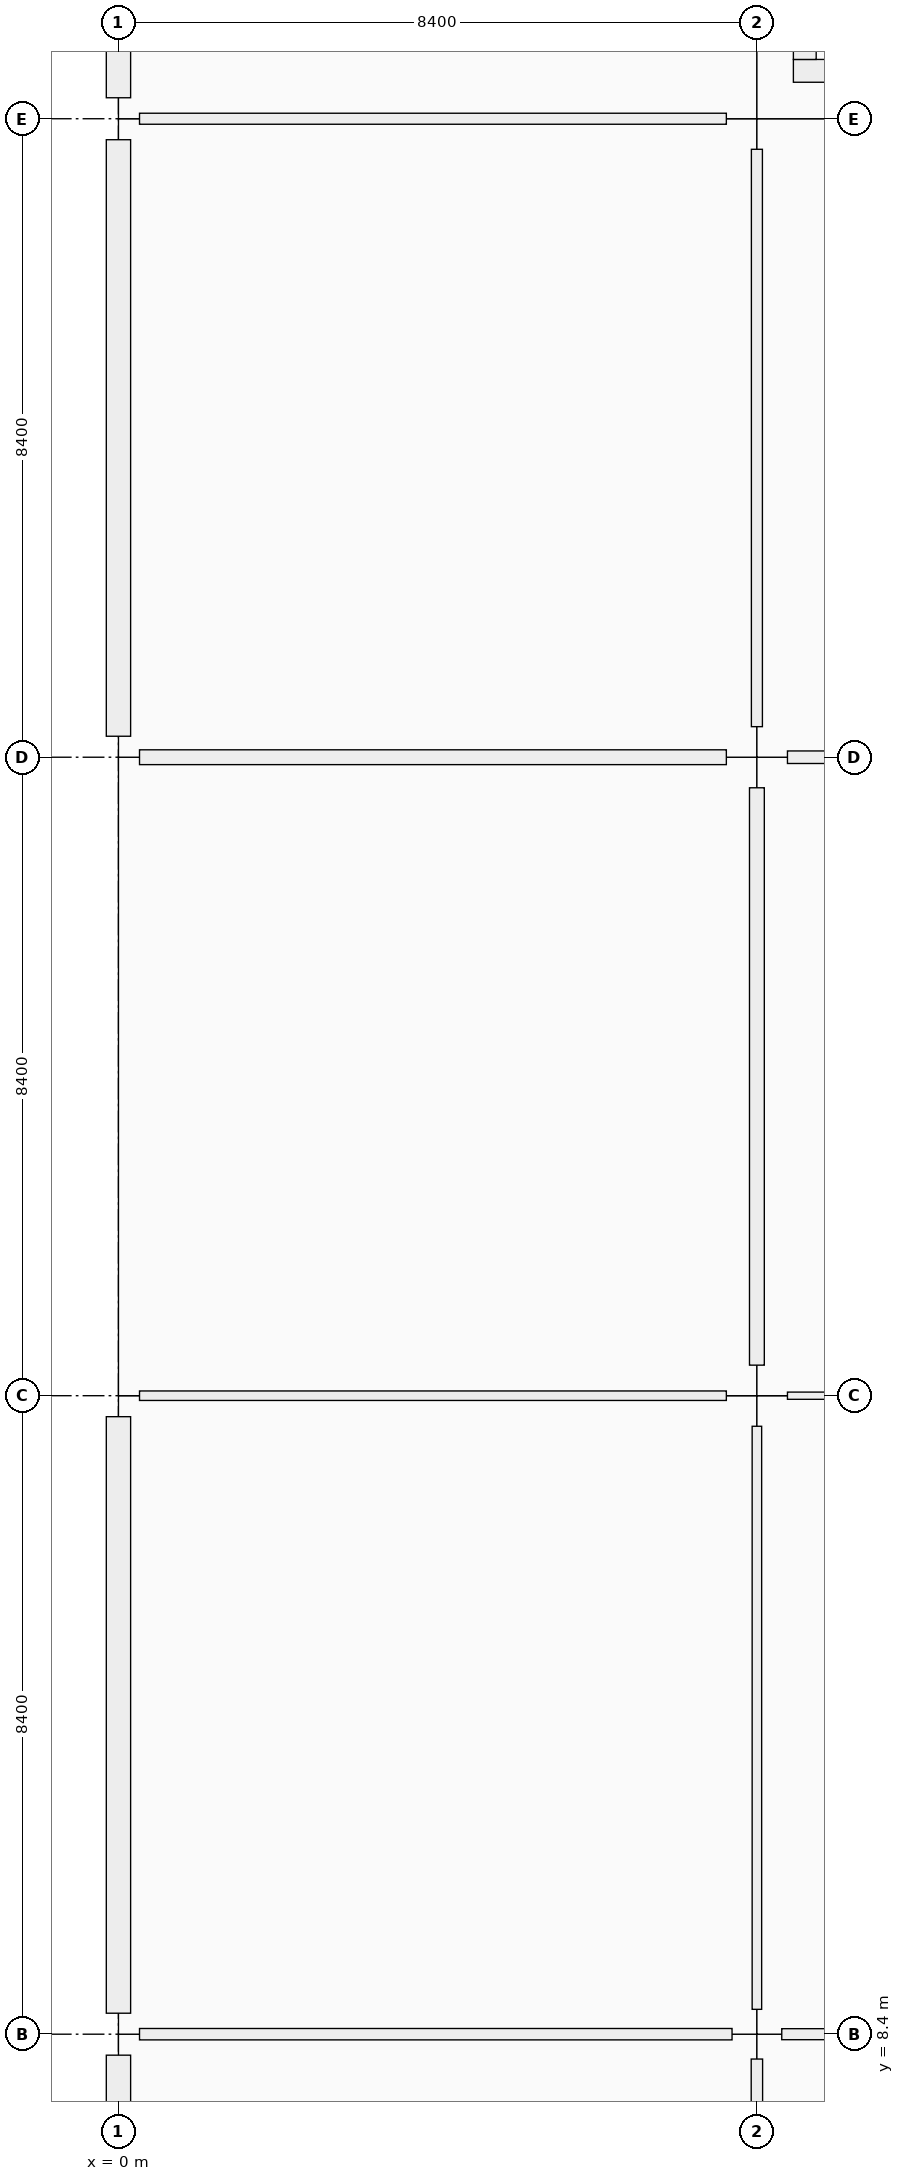
"""IFC4 building model, lengths in metres.
Left out: names, types, materials, properties, quantities, classifications, styles, units other than length and angle.
Written with IfcOpenShell. Run it as: python <this file> out.ifc"""

import sys

from ifc_helpers import new_model, si_unit, direction, frame, frame_2d, origin, origin_2d, place, context, subcontext, project, spatial, rectangle, extrude, element, fill, save


model = new_model("IFC4")
c1 = context("Model", 3, precision=1e-05, world=origin(), true_north=direction((0.0, 1.0)))
c2 = subcontext(c1, "Body", "Model", "MODEL_VIEW")
j1 = project(units=[si_unit("LENGTHUNIT", "METRE"), si_unit("PLANEANGLEUNIT", "RADIAN")], contexts=[c1])
p1 = place(None, origin())
s1 = spatial("IfcSite", under=j1, at=p1, CompositionType="ELEMENT")
p2 = place(p1, origin())
s2 = spatial("IfcBuilding", under=s1, at=p2, CompositionType="ELEMENT")
p3 = place(p2, frame((0.0, 0.0, 5.76)))
s3 = spatial("IfcBuildingStorey", under=s2, at=p3, CompositionType="ELEMENT", Elevation=5.76)
for number, where, z_axis, x_axis in (
    (1, (0.0, 8.4, 0.0), (0.0, 0.0, 1.0), (1.0, 0.0, 0.0)),
    (2, (0.0, 16.8, 0.0), (0.0, 0.0, 1.0), (1.0, 0.0, 0.0)),
    (3, (0.0, 25.2, 0.0), (0.0, 0.0, 1.0), (1.0, 0.0, 0.0)),
    (4, (0.0, 33.6, 0.0), (0.0, 0.0, 1.0), (1.0, 0.0, 0.0)),
):
    element("IfcColumn", number, at=place(p3, frame(where, z_axis=z_axis, x_axis=x_axis)), inside=s3, PredefinedType="COLUMN", context=c2, shape_type="SweptSolid", body=[
        extrude(rectangle(XDim=0.55, YDim=0.55, at=origin_2d()), origin(), (0.0, 0.0, 1.0), 4.2),
    ])
p4 = place(p3, frame((8.4, 8.4, 0.0), z_axis=(0.0, 0.0, 1.0), x_axis=(1.0, 0.0, 0.0)))
e5 = element("IfcColumn", 5, at=p4, inside=s3, PredefinedType="COLUMN", context=c2, shape_type="SweptSolid", body=[
    extrude(rectangle(XDim=0.65, YDim=0.65, at=origin_2d()), origin(), (0.0, 0.0, 1.0), 4.5),
])
for number, where, z_axis, x_axis in (
    (6, (8.4, 16.8, 0.0), (0.0, 0.0, 1.0), (1.0, 0.0, 0.0)),
    (7, (8.4, 25.2, 0.0), (0.0, 0.0, 1.0), (1.0, 0.0, 0.0)),
    (8, (8.4, 33.6, 0.0), (0.0, 0.0, 1.0), (1.0, 0.0, 0.0)),
):
    element("IfcColumn", number, at=place(p3, frame(where, z_axis=z_axis, x_axis=x_axis)), inside=s3, PredefinedType="COLUMN", context=c2, shape_type="SweptSolid", body=[
        extrude(rectangle(XDim=0.8, YDim=0.8, at=origin_2d()), origin(), (0.0, 0.0, 1.0), 4.5),
    ])
p5 = place(p3, frame((0.0, 0.276, 0.0), z_axis=(0.0, 0.0, 1.0), x_axis=(0.0, 1.0, 0.0)))
e9 = element("IfcWall", 9, at=p5, inside=s3, PredefinedType="SOLIDWALL", context=c2, shape_type="SweptSolid", body=[
    extrude(rectangle(XDim=7.848, YDim=0.32, at=frame_2d((3.924, 0.0))), origin(), (0.0, 0.0, 1.0), 3.4),
])
p6 = place(p5, frame((2.524, 0.0, 0.9)))
e10 = element("IfcOpeningElement", 10, at=p6, cuts=e9, PredefinedType="OPENING", context=c2, shape_type="SweptSolid", body=[
    extrude(rectangle(XDim=2.8, YDim=1.75, at=frame_2d((1.4, 0.875))), frame((0.0, 0.16, 0.0), z_axis=(0.0, -1.0, 0.0), x_axis=(1.0, 0.0, 0.0)), (0.0, 0.0, 1.0), 0.32),
])
p7 = place(p3, frame((0.0, 8.676, 0.0), z_axis=(0.0, 0.0, 1.0), x_axis=(0.0, 1.0, 0.0)))
e11 = element("IfcWall", 11, at=p7, inside=s3, PredefinedType="SOLIDWALL", context=c2, shape_type="SweptSolid", body=[
    extrude(rectangle(XDim=7.848, YDim=0.32, at=frame_2d((3.924, 0.0))), origin(), (0.0, 0.0, 1.0), 3.4),
])
p8 = place(p7, frame((2.974, 0.0, 0.9)))
e12 = element("IfcOpeningElement", 12, at=p8, cuts=e11, PredefinedType="OPENING", context=c2, shape_type="SweptSolid", body=[
    extrude(rectangle(XDim=1.9, YDim=1.75, at=frame_2d((0.95, 0.875))), frame((0.0, 0.16, 0.0), z_axis=(0.0, -1.0, 0.0), x_axis=(1.0, 0.0, 0.0)), (0.0, 0.0, 1.0), 0.32),
])
p9 = place(p3, frame((0.0, 25.476, 0.0), z_axis=(0.0, 0.0, 1.0), x_axis=(0.0, 1.0, 0.0)))
e13 = element("IfcWall", 13, at=p9, inside=s3, PredefinedType="SOLIDWALL", context=c2, shape_type="SweptSolid", body=[
    extrude(rectangle(XDim=7.848, YDim=0.32, at=frame_2d((3.924, 0.0))), origin(), (0.0, 0.0, 1.0), 3.4),
])
p10 = place(p9, frame((3.224, 0.0, 0.9)))
e14 = element("IfcOpeningElement", 14, at=p10, cuts=e13, PredefinedType="OPENING", context=c2, shape_type="SweptSolid", body=[
    extrude(rectangle(XDim=1.4, YDim=1.75, at=frame_2d((0.7, 0.875))), frame((0.0, 0.16, 0.0), z_axis=(0.0, -1.0, 0.0), x_axis=(1.0, 0.0, 0.0)), (0.0, 0.0, 1.0), 0.32),
])
p11 = place(p3, frame((0.0, 33.876, 0.0), z_axis=(0.0, 0.0, 1.0), x_axis=(0.0, 1.0, 0.0)))
e15 = element("IfcWall", 15, at=p11, inside=s3, PredefinedType="SOLIDWALL", context=c2, shape_type="SweptSolid", body=[
    extrude(rectangle(XDim=7.848, YDim=0.32, at=frame_2d((3.924, 0.0))), origin(), (0.0, 0.0, 1.0), 3.4),
])
p12 = place(p11, frame((2.324, 0.0, 0.9)))
e16 = element("IfcOpeningElement", 16, at=p12, cuts=e15, PredefinedType="OPENING", context=c2, shape_type="SweptSolid", body=[
    extrude(rectangle(XDim=3.2, YDim=1.75, at=frame_2d((1.6, 0.875))), frame((0.0, 0.16, 0.0), z_axis=(0.0, -1.0, 0.0), x_axis=(1.0, 0.0, 0.0)), (0.0, 0.0, 1.0), 0.32),
])
p13 = place(p3, frame((16.32, 34.23, 0.0), z_axis=(0.0, 0.0, 1.0), x_axis=(-1.0, 0.0, 0.0)))
e17 = element("IfcWall", 17, at=p13, inside=s3, PredefinedType="SHEAR", context=c2, shape_type="SweptSolid", body=[
    extrude(rectangle(XDim=7.44, YDim=0.3, at=frame_2d((3.72, 0.0))), origin(), (0.0, 0.0, 1.0), 4.5),
])
p14 = place(p13, frame((1.28, 0.0, 0.0)))
e18 = element("IfcOpeningElement", 18, at=p14, cuts=e17, PredefinedType="OPENING", context=c2, shape_type="SweptSolid", body=[
    extrude(rectangle(XDim=1.5, YDim=2.15, at=frame_2d((0.75, 1.075))), frame((0.0, 0.15, 0.0), z_axis=(0.0, -1.0, 0.0), x_axis=(1.0, 0.0, 0.0)), (0.0, 0.0, 1.0), 0.3),
])
p15 = place(p3, frame((9.03, 34.38, 0.0), z_axis=(0.0, 0.0, 1.0), x_axis=(0.0, 1.0, 0.0)))
e19 = element("IfcWall", 19, at=p15, inside=s3, PredefinedType="SHEAR", context=c2, shape_type="SweptSolid", body=[
    extrude(rectangle(XDim=6.84, YDim=0.3, at=frame_2d((3.42, 0.0))), origin(), (0.0, 0.0, 1.0), 4.5),
])
p16 = place(p3, frame((0.277, 8.4, 0.0), z_axis=(0.0, 0.0, 1.0), x_axis=(1.0, 0.0, 0.0)))
e20 = element("IfcWall", 20, at=p16, inside=s3, PredefinedType="MOVABLE", context=c2, shape_type="SweptSolid", body=[
    extrude(rectangle(XDim=7.796, YDim=0.15, at=frame_2d((3.898, 0.0))), origin(), (0.0, 0.0, 1.0), 2.4),
])
p17 = place(p16, frame((3.358, 0.0, 0.0)))
e21 = element("IfcOpeningElement", 21, at=p17, cuts=e20, PredefinedType="OPENING", context=c2, shape_type="SweptSolid", body=[
    extrude(rectangle(XDim=1.08, YDim=2.22, at=frame_2d((0.54, 1.11))), frame((0.0, 0.075, 0.0), z_axis=(0.0, -1.0, 0.0), x_axis=(1.0, 0.0, 0.0)), (0.0, 0.0, 1.0), 0.15),
])
p18 = place(p3, frame((0.277, 16.8, 0.0), z_axis=(0.0, 0.0, 1.0), x_axis=(1.0, 0.0, 0.0)))
e22 = element("IfcWall", 22, at=p18, inside=s3, PredefinedType="PARTITIONING", context=c2, shape_type="SweptSolid", body=[
    extrude(rectangle(XDim=7.721, YDim=0.125, at=frame_2d((3.86, 0.0))), origin(), (0.0, 0.0, 1.0), 2.4),
])
p19 = place(p18, frame((3.33, 0.0, 0.0)))
e23 = element("IfcOpeningElement", 23, at=p19, cuts=e22, PredefinedType="OPENING", context=c2, shape_type="SweptSolid", body=[
    extrude(rectangle(XDim=1.06, YDim=2.22, at=frame_2d((0.53, 1.11))), frame((0.0, 0.062, 0.0), z_axis=(0.0, -1.0, 0.0), x_axis=(1.0, 0.0, 0.0)), (0.0, 0.0, 1.0), 0.125),
])
p20 = place(p3, frame((0.277, 25.2, 0.0), z_axis=(0.0, 0.0, 1.0), x_axis=(1.0, 0.0, 0.0)))
e24 = element("IfcWall", 24, at=p20, inside=s3, PredefinedType="PARTITIONING", context=c2, shape_type="SweptSolid", body=[
    extrude(rectangle(XDim=7.721, YDim=0.195, at=frame_2d((3.86, 0.0))), origin(), (0.0, 0.0, 1.0), 2.4),
])
p21 = place(p20, frame((3.396, 0.0, 0.0)))
e25 = element("IfcOpeningElement", 25, at=p21, cuts=e24, PredefinedType="OPENING", context=c2, shape_type="SweptSolid", body=[
    extrude(rectangle(XDim=0.93, YDim=2.12, at=frame_2d((0.465, 1.06))), frame((0.0, 0.098, 0.0), z_axis=(0.0, -1.0, 0.0), x_axis=(1.0, 0.0, 0.0)), (0.0, 0.0, 1.0), 0.195),
])
p22 = place(p3, frame((0.277, 33.6, 0.0), z_axis=(0.0, 0.0, 1.0), x_axis=(1.0, 0.0, 0.0)))
e26 = element("IfcWall", 26, at=p22, inside=s3, PredefinedType="PARTITIONING", context=c2, shape_type="SweptSolid", body=[
    extrude(rectangle(XDim=7.721, YDim=0.145, at=frame_2d((3.86, 0.0))), origin(), (0.0, 0.0, 1.0), 2.4),
])
p23 = place(p22, frame((3.341, 0.0, 0.0)))
e27 = element("IfcOpeningElement", 27, at=p23, cuts=e26, PredefinedType="OPENING", context=c2, shape_type="SweptSolid", body=[
    extrude(rectangle(XDim=1.04, YDim=2.2, at=frame_2d((0.52, 1.1))), frame((0.0, 0.073, 0.0), z_axis=(0.0, -1.0, 0.0), x_axis=(1.0, 0.0, 0.0)), (0.0, 0.0, 1.0), 0.145),
])
p24 = place(p3, frame((8.727, 8.4, 0.0), z_axis=(0.0, 0.0, 1.0), x_axis=(1.0, 0.0, 0.0)))
e28 = element("IfcWall", 28, at=p24, inside=s3, PredefinedType="PARTITIONING", context=c2, shape_type="SweptSolid", body=[
    extrude(rectangle(XDim=7.771, YDim=0.145, at=frame_2d((3.885, 0.0))), origin(), (0.0, 0.0, 1.0), 2.4),
])
p25 = place(p24, frame((3.415, 0.0, 0.0)))
e29 = element("IfcOpeningElement", 29, at=p25, cuts=e28, PredefinedType="OPENING", context=c2, shape_type="SweptSolid", body=[
    extrude(rectangle(XDim=0.94, YDim=2.15, at=frame_2d((0.47, 1.075))), frame((0.0, 0.073, 0.0), z_axis=(0.0, -1.0, 0.0), x_axis=(1.0, 0.0, 0.0)), (0.0, 0.0, 1.0), 0.145),
])
p26 = place(p3, frame((8.802, 16.8, 0.0), z_axis=(0.0, 0.0, 1.0), x_axis=(1.0, 0.0, 0.0)))
e30 = element("IfcWall", 30, at=p26, inside=s3, PredefinedType="PARTITIONING", context=c2, shape_type="SweptSolid", body=[
    extrude(rectangle(XDim=7.596, YDim=0.095, at=frame_2d((3.798, 0.0))), origin(), (0.0, 0.0, 1.0), 2.4),
])
p27 = place(p26, frame((3.258, 0.0, 0.0)))
e31 = element("IfcOpeningElement", 31, at=p27, cuts=e30, PredefinedType="OPENING", context=c2, shape_type="SweptSolid", body=[
    extrude(rectangle(XDim=1.08, YDim=2.22, at=frame_2d((0.54, 1.11))), frame((0.0, 0.047, 0.0), z_axis=(0.0, -1.0, 0.0), x_axis=(1.0, 0.0, 0.0)), (0.0, 0.0, 1.0), 0.095),
])
p28 = place(p3, frame((8.802, 25.2, 0.0), z_axis=(0.0, 0.0, 1.0), x_axis=(1.0, 0.0, 0.0)))
e32 = element("IfcWall", 32, at=p28, inside=s3, PredefinedType="PARTITIONING", context=c2, shape_type="SweptSolid", body=[
    extrude(rectangle(XDim=7.596, YDim=0.165, at=frame_2d((3.798, 0.0))), origin(), (0.0, 0.0, 1.0), 2.4),
])
p29 = place(p28, frame((3.318, 0.0, 0.0)))
e33 = element("IfcOpeningElement", 33, at=p29, cuts=e32, PredefinedType="OPENING", context=c2, shape_type="SweptSolid", body=[
    extrude(rectangle(XDim=0.96, YDim=2.18, at=frame_2d((0.48, 1.09))), frame((0.0, 0.083, 0.0), z_axis=(0.0, -1.0, 0.0), x_axis=(1.0, 0.0, 0.0)), (0.0, 0.0, 1.0), 0.165),
])
p30 = place(p3, frame((8.4, 0.277, 0.0), z_axis=(0.0, 0.0, 1.0), x_axis=(0.0, 1.0, 0.0)))
e34 = element("IfcWall", 34, at=p30, inside=s3, PredefinedType="MOVABLE", context=c2, shape_type="SweptSolid", body=[
    extrude(rectangle(XDim=7.796, YDim=0.15, at=frame_2d((3.898, 0.0))), origin(), (0.0, 0.0, 1.0), 2.4),
])
p31 = place(p30, frame((3.388, 0.0, 0.0)))
e35 = element("IfcOpeningElement", 35, at=p31, cuts=e34, PredefinedType="OPENING", context=c2, shape_type="SweptSolid", body=[
    extrude(rectangle(XDim=1.02, YDim=2.2, at=frame_2d((0.51, 1.1))), frame((0.0, 0.075, 0.0), z_axis=(0.0, -1.0, 0.0), x_axis=(1.0, 0.0, 0.0)), (0.0, 0.0, 1.0), 0.15),
])
p32 = place(p3, frame((8.4, 8.727, 0.0), z_axis=(0.0, 0.0, 1.0), x_axis=(0.0, 1.0, 0.0)))
e36 = element("IfcWall", 36, at=p32, inside=s3, PredefinedType="PARTITIONING", context=c2, shape_type="SweptSolid", body=[
    extrude(rectangle(XDim=7.671, YDim=0.125, at=frame_2d((3.835, 0.0))), origin(), (0.0, 0.0, 1.0), 2.4),
])
p33 = place(p32, frame((3.336, 0.0, 0.0)))
e37 = element("IfcOpeningElement", 37, at=p33, cuts=e36, PredefinedType="OPENING", context=c2, shape_type="SweptSolid", body=[
    extrude(rectangle(XDim=1.0, YDim=2.2, at=frame_2d((0.5, 1.1))), frame((0.0, 0.062, 0.0), z_axis=(0.0, -1.0, 0.0), x_axis=(1.0, 0.0, 0.0)), (0.0, 0.0, 1.0), 0.125),
])
p34 = place(p3, frame((8.4, 17.202, 0.0), z_axis=(0.0, 0.0, 1.0), x_axis=(0.0, 1.0, 0.0)))
e38 = element("IfcWall", 38, at=p34, inside=s3, PredefinedType="PARTITIONING", context=c2, shape_type="SweptSolid", body=[
    extrude(rectangle(XDim=7.596, YDim=0.195, at=frame_2d((3.798, 0.0))), origin(), (0.0, 0.0, 1.0), 2.4),
])
p35 = place(p34, frame((3.308, 0.0, 0.0)))
e39 = element("IfcOpeningElement", 39, at=p35, cuts=e38, PredefinedType="OPENING", context=c2, shape_type="SweptSolid", body=[
    extrude(rectangle(XDim=0.98, YDim=2.18, at=frame_2d((0.49, 1.09))), frame((0.0, 0.098, 0.0), z_axis=(0.0, -1.0, 0.0), x_axis=(1.0, 0.0, 0.0)), (0.0, 0.0, 1.0), 0.195),
])
p36 = place(p3, frame((8.4, 25.602, 0.0), z_axis=(0.0, 0.0, 1.0), x_axis=(0.0, 1.0, 0.0)))
e40 = element("IfcWall", 40, at=p36, inside=s3, PredefinedType="PARTITIONING", context=c2, shape_type="SweptSolid", body=[
    extrude(rectangle(XDim=7.596, YDim=0.145, at=frame_2d((3.798, 0.0))), origin(), (0.0, 0.0, 1.0), 2.4),
])
p37 = place(p36, frame((3.313, 0.0, 0.0)))
e41 = element("IfcOpeningElement", 41, at=p37, cuts=e40, PredefinedType="OPENING", context=c2, shape_type="SweptSolid", body=[
    extrude(rectangle(XDim=0.97, YDim=2.12, at=frame_2d((0.485, 1.06))), frame((0.0, 0.073, 0.0), z_axis=(0.0, -1.0, 0.0), x_axis=(1.0, 0.0, 0.0)), (0.0, 0.0, 1.0), 0.145),
])
p38 = place(p8, origin())
e42 = element("IfcWindow", 42, at=p38, inside=s3, PartitioningType="SINGLE_PANEL", PredefinedType="WINDOW", context=c2, shape_type="SweptSolid", body=[
    extrude(rectangle(XDim=1.9, YDim=1.75, at=frame_2d((0.95, 0.875))), frame((0.0, 0.03, 0.0), z_axis=(0.0, -1.0, 0.0), x_axis=(1.0, 0.0, 0.0)), (0.0, 0.0, 1.0), 0.06),
])
fill(e12, e42)
p39 = place(p10, origin())
e43 = element("IfcWindow", 43, at=p39, inside=s3, PartitioningType="SINGLE_PANEL", PredefinedType="WINDOW", context=c2, shape_type="SweptSolid", body=[
    extrude(rectangle(XDim=1.4, YDim=1.75, at=frame_2d((0.7, 0.875))), frame((0.0, 0.03, 0.0), z_axis=(0.0, -1.0, 0.0), x_axis=(1.0, 0.0, 0.0)), (0.0, 0.0, 1.0), 0.06),
])
fill(e14, e43)
p40 = place(p37, origin())
e44 = element("IfcDoor", 44, at=p40, inside=s3, OperationType="SINGLE_SWING_RIGHT", PredefinedType="DOOR", context=c2, shape_type="SweptSolid", body=[
    extrude(rectangle(XDim=0.97, YDim=2.12, at=frame_2d((0.485, 1.06))), frame((0.0, 0.025, 0.0), z_axis=(0.0, -1.0, 0.0), x_axis=(1.0, 0.0, 0.0)), (0.0, 0.0, 1.0), 0.05),
])
fill(e41, e44)
p41 = place(p17, origin())
e45 = element("IfcDoor", 45, at=p41, inside=s3, OperationType="SINGLE_SWING_LEFT", PredefinedType="DOOR", context=c2, shape_type="SweptSolid", body=[
    extrude(rectangle(XDim=1.08, YDim=2.22, at=frame_2d((0.54, 1.11))), frame((0.0, 0.025, 0.0), z_axis=(0.0, -1.0, 0.0), x_axis=(1.0, 0.0, 0.0)), (0.0, 0.0, 1.0), 0.05),
])
fill(e21, e45)
p42 = place(p19, origin())
e46 = element("IfcDoor", 46, at=p42, inside=s3, OperationType="SINGLE_SWING_RIGHT", PredefinedType="DOOR", context=c2, shape_type="SweptSolid", body=[
    extrude(rectangle(XDim=1.06, YDim=2.22, at=frame_2d((0.53, 1.11))), frame((0.0, 0.025, 0.0), z_axis=(0.0, -1.0, 0.0), x_axis=(1.0, 0.0, 0.0)), (0.0, 0.0, 1.0), 0.05),
])
fill(e23, e46)
p43 = place(p23, origin())
e47 = element("IfcDoor", 47, at=p43, inside=s3, OperationType="SINGLE_SWING_LEFT", PredefinedType="DOOR", context=c2, shape_type="SweptSolid", body=[
    extrude(rectangle(XDim=1.04, YDim=2.2, at=frame_2d((0.52, 1.1))), frame((0.0, 0.025, 0.0), z_axis=(0.0, -1.0, 0.0), x_axis=(1.0, 0.0, 0.0)), (0.0, 0.0, 1.0), 0.05),
])
fill(e27, e47)
p44 = place(p21, origin())
e48 = element("IfcDoor", 48, at=p44, inside=s3, OperationType="SINGLE_SWING_LEFT", PredefinedType="DOOR", context=c2, shape_type="SweptSolid", body=[
    extrude(rectangle(XDim=0.93, YDim=2.12, at=frame_2d((0.465, 1.06))), frame((0.0, 0.025, 0.0), z_axis=(0.0, -1.0, 0.0), x_axis=(1.0, 0.0, 0.0)), (0.0, 0.0, 1.0), 0.05),
])
fill(e25, e48)
p45 = place(p33, origin())
e49 = element("IfcDoor", 49, at=p45, inside=s3, OperationType="SINGLE_SWING_LEFT", PredefinedType="DOOR", context=c2, shape_type="SweptSolid", body=[
    extrude(rectangle(XDim=1.0, YDim=2.2, at=frame_2d((0.5, 1.1))), frame((0.0, 0.025, 0.0), z_axis=(0.0, -1.0, 0.0), x_axis=(1.0, 0.0, 0.0)), (0.0, 0.0, 1.0), 0.05),
])
fill(e37, e49)
p46 = place(p35, origin())
e50 = element("IfcDoor", 50, at=p46, inside=s3, OperationType="SINGLE_SWING_RIGHT", PredefinedType="DOOR", context=c2, shape_type="SweptSolid", body=[
    extrude(rectangle(XDim=0.98, YDim=2.18, at=frame_2d((0.49, 1.09))), frame((0.0, 0.025, 0.0), z_axis=(0.0, -1.0, 0.0), x_axis=(1.0, 0.0, 0.0)), (0.0, 0.0, 1.0), 0.05),
])
fill(e39, e50)
save(model, sys.argv[1])
